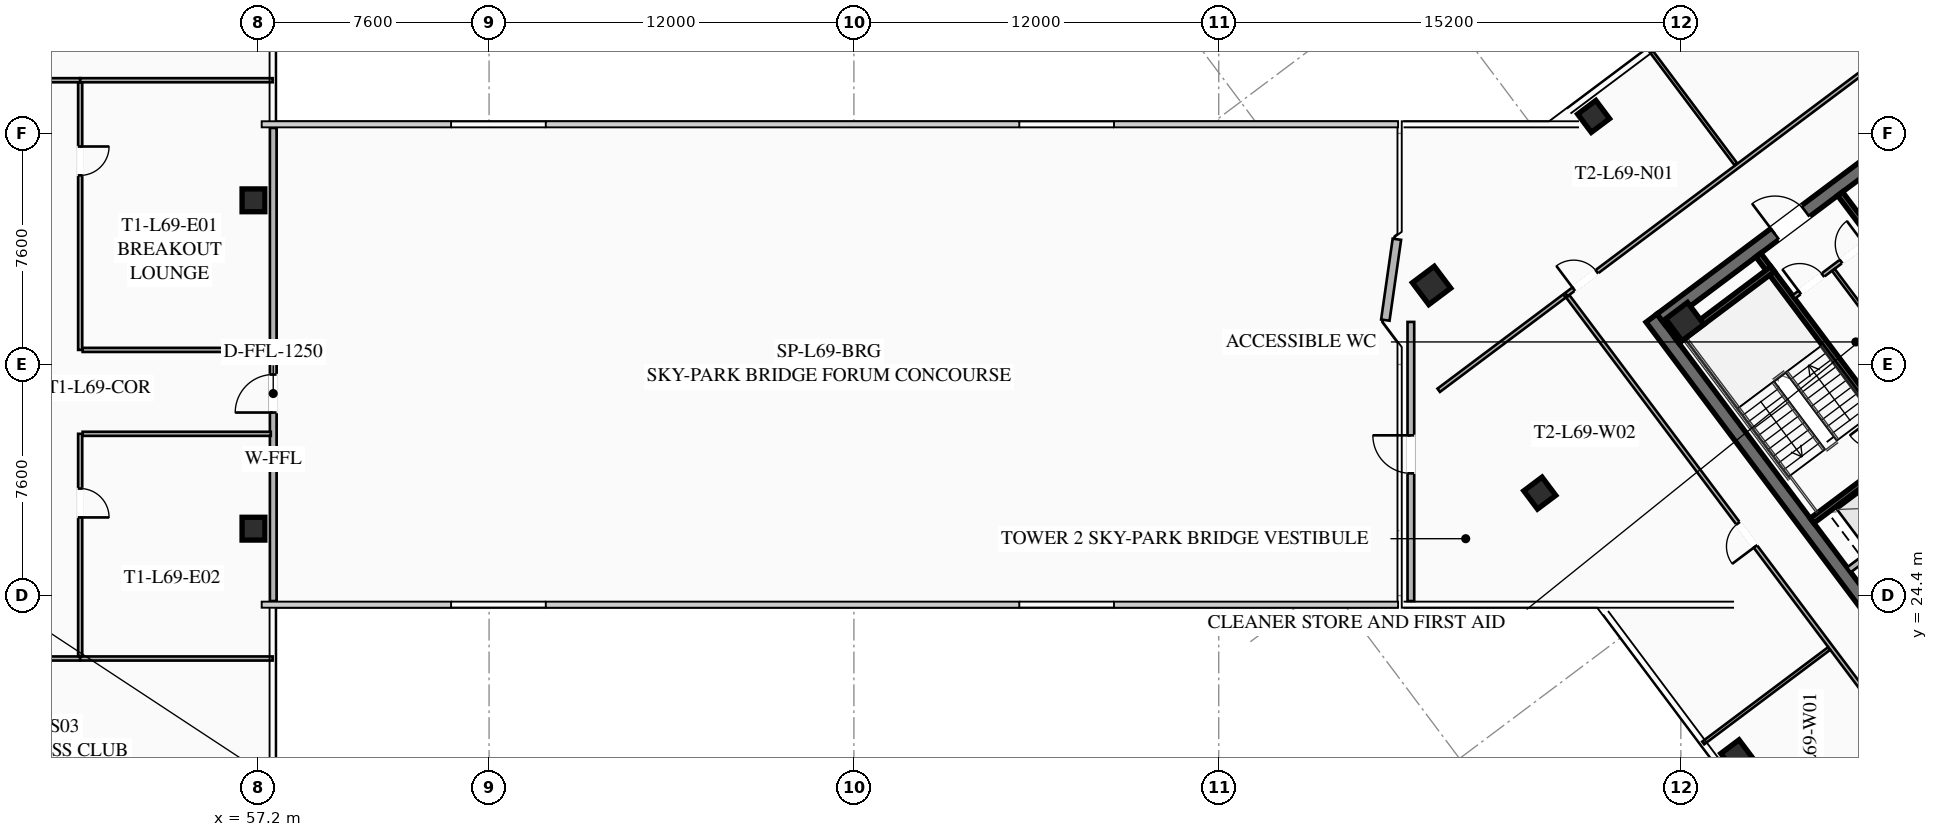
"""IFC4 building model, lengths in metres.
Left out: names, types, materials, properties, quantities, classifications, styles, units other than length and angle.
Written with IfcOpenShell. Run it as: python <this file> out.ifc"""

import sys

from ifc_helpers import new_model, si_unit, direction, frame, frame_2d, origin, origin_2d, place, context, subcontext, project, spatial, rectangle, hollow_rectangle, extrude, element, fill, save


model = new_model("IFC4")
c1 = context("Model", 3, precision=1e-05, world=origin(), true_north=direction((0.0, 1.0)))
c2 = subcontext(c1, "Body", "Model", "MODEL_VIEW")
j1 = project(units=[si_unit("LENGTHUNIT", "METRE"), si_unit("PLANEANGLEUNIT", "RADIAN")], contexts=[c1])
p1 = place(None, origin())
s1 = spatial("IfcSite", under=j1, at=p1, CompositionType="ELEMENT")
p2 = place(p1, origin())
s2 = spatial("IfcBuilding", under=s1, at=p2, CompositionType="ELEMENT")
p3 = place(p2, frame((0.0, 0.0, 255.4)))
s3 = spatial("IfcBuildingStorey", under=s2, at=p3, CompositionType="ELEMENT", Elevation=255.4)
for number, where, z_axis, x_axis in (
    (1, (57.05, 26.6, 0.0), (0.0, 0.0, 1.0), (1.0, 0.0, 0.0)),
    (2, (57.05, 37.4, 0.0), (0.0, 0.0, 1.0), (1.0, 0.0, 0.0)),
):
    element("IfcColumn", number, at=place(p3, frame(where, z_axis=z_axis, x_axis=x_axis)), inside=s3, PredefinedType="COLUMN", context=c2, shape_type="SweptSolid", body=[
        extrude(hollow_rectangle(XDim=0.75, YDim=0.75, WallThickness=0.032, at=origin_2d()), origin(), (0.0, 0.0, 1.0), 3.78),
    ])
p4 = place(p3, frame((112.396, 21.047, 0.0), z_axis=(0.0, 0.0, 1.0), x_axis=(-0.600005007985, 0.799996243986, 0.0)))
e3 = element("IfcWall", 3, at=p4, inside=s3, PredefinedType="SHEAR", context=c2, shape_type="SweptSolid", body=[
    extrude(rectangle(XDim=15.6, YDim=0.45, at=frame_2d((7.8, 0.0))), origin(), (0.0, 0.0, 1.0), 4.0),
])
p5 = place(p3, frame((103.351, 33.482, 0.0), z_axis=(0.0, 0.0, 1.0), x_axis=(0.8, 0.6, 0.0)))
e4 = element("IfcWall", 4, at=p5, inside=s3, PredefinedType="SHEAR", context=c2, shape_type="SweptSolid", body=[
    extrude(rectangle(XDim=15.26, YDim=0.45, at=frame_2d((7.63, 0.0))), origin(), (0.0, 0.0, 1.0), 4.0),
])
p6 = place(p5, frame((4.68, 0.0, 0.0)))
e5 = element("IfcOpeningElement", 5, at=p6, cuts=e4, PredefinedType="OPENING", context=c2, shape_type="SweptSolid", body=[
    extrude(rectangle(XDim=1.25, YDim=2.25, at=frame_2d((0.625, 1.125))), frame((0.0, 0.235, 0.0), z_axis=(0.0, -1.0, 0.0), x_axis=(1.0, 0.0, 0.0)), (0.0, 0.0, 1.0), 0.47),
])
p7 = place(p5, frame((9.73, 0.0, 0.0)))
e6 = element("IfcOpeningElement", 6, at=p7, cuts=e4, PredefinedType="OPENING", context=c2, shape_type="SweptSolid", body=[
    extrude(rectangle(XDim=1.25, YDim=2.25, at=frame_2d((0.625, 1.125))), frame((0.0, 0.235, 0.0), z_axis=(0.0, -1.0, 0.0), x_axis=(1.0, 0.0, 0.0)), (0.0, 0.0, 1.0), 0.47),
])
for number, where, z_axis, x_axis in (
    (7, (104.13, 33.41, 0.0), (0.0, 0.0, 1.0), (0.8, 0.6, 0.0)),
    (8, (95.8, 34.6, 0.0), (0.0, 0.0, 1.0), (0.8, 0.6, 0.0)),
):
    element("IfcColumn", number, at=place(p3, frame(where, z_axis=z_axis, x_axis=x_axis)), inside=s3, PredefinedType="COLUMN", context=c2, shape_type="SweptSolid", body=[
        extrude(hollow_rectangle(XDim=0.9, YDim=0.9, WallThickness=0.04, at=origin_2d()), origin(), (0.0, 0.0, 1.0), 3.78),
    ])
for number, where, z_axis, x_axis in (
    (9, (101.13, 40.16, 0.0), (0.0, 0.0, 1.0), (0.8, 0.6, 0.0)),
    (10, (99.36, 27.77, 0.0), (0.0, 0.0, 1.0), (0.8, 0.6, 0.0)),
    (11, (105.84, 19.13, 0.0), (0.0, 0.0, 1.0), (0.8, 0.6, 0.0)),
):
    element("IfcColumn", number, at=place(p3, frame(where, z_axis=z_axis, x_axis=x_axis)), inside=s3, PredefinedType="COLUMN", context=c2, shape_type="SweptSolid", body=[
        extrude(hollow_rectangle(XDim=0.75, YDim=0.75, WallThickness=0.032, at=origin_2d()), origin(), (0.0, 0.0, 1.0), 3.78),
    ])
p8 = place(p3, frame((94.28, 33.46, 0.0), z_axis=(0.0, 0.0, 1.0), x_axis=(0.141370477216, 0.989956760759, 0.0)))
e12 = element("IfcWall", 12, at=p8, inside=s3, PredefinedType="SOLIDWALL", context=c2, shape_type="SweptSolid", body=[
    extrude(rectangle(XDim=2.687, YDim=0.28, at=frame_2d((1.344, 0.0))), origin(), (0.0, 0.0, 1.0), 2.96),
])
p9 = place(p3, frame((57.7, 24.22, 0.0), z_axis=(0.0, 0.0, 1.0), x_axis=(0.0, 1.0, 0.0)))
e13 = element("IfcWall", 13, at=p9, inside=s3, PredefinedType="SOLIDWALL", context=c2, shape_type="SweptSolid", body=[
    extrude(rectangle(XDim=15.56, YDim=0.22, at=frame_2d((7.78, 0.0))), origin(), (0.0, 0.0, 1.0), 2.971),
])
p10 = place(p9, frame((6.2, 0.0, 0.0)))
e14 = element("IfcOpeningElement", 14, at=p10, cuts=e13, PredefinedType="OPENING", context=c2, shape_type="SweptSolid", body=[
    extrude(rectangle(XDim=1.25, YDim=2.25, at=frame_2d((0.625, 1.125))), frame((0.0, 0.12, 0.0), z_axis=(0.0, -1.0, 0.0), x_axis=(1.0, 0.0, 0.0)), (0.0, 0.0, 1.0), 0.24),
])
p11 = place(p3, frame((95.12, 24.22, 0.0), z_axis=(0.0, 0.0, 1.0), x_axis=(0.0, 1.0, 0.0)))
e15 = element("IfcWall", 15, at=p11, inside=s3, PredefinedType="SOLIDWALL", context=c2, shape_type="SweptSolid", body=[
    extrude(rectangle(XDim=9.18, YDim=0.22, at=frame_2d((4.59, 0.0))), origin(), (0.0, 0.0, 1.0), 2.971),
])
p12 = place(p11, frame((4.2, 0.0, 0.0)))
e16 = element("IfcOpeningElement", 16, at=p12, cuts=e15, PredefinedType="OPENING", context=c2, shape_type="SweptSolid", body=[
    extrude(rectangle(XDim=1.25, YDim=2.25, at=frame_2d((0.625, 1.125))), frame((0.0, 0.12, 0.0), z_axis=(0.0, -1.0, 0.0), x_axis=(1.0, 0.0, 0.0)), (0.0, 0.0, 1.0), 0.24),
])
p13 = place(p3, frame((28.45, 41.35, 0.0), z_axis=(0.0, 0.0, 1.0), x_axis=(1.0, 0.0, 0.0)))
e17 = element("IfcWall", 17, at=p13, inside=s3, PredefinedType="PARTITIONING", context=c2, shape_type="SweptSolid", body=[
    extrude(rectangle(XDim=22.9, YDim=0.135, at=frame_2d((11.45, 0.0))), origin(), (0.0, 0.0, 1.0), 2.971),
])
p14 = place(p13, frame((0.3, 0.0, 0.0)))
e18 = element("IfcOpeningElement", 18, at=p14, cuts=e17, PredefinedType="OPENING", context=c2, shape_type="SweptSolid", body=[
    extrude(rectangle(XDim=0.95, YDim=2.05, at=frame_2d((0.475, 1.025))), frame((0.0, 0.077, 0.0), z_axis=(0.0, -1.0, 0.0), x_axis=(1.0, 0.0, 0.0)), (0.0, 0.0, 1.0), 0.155),
])
p15 = place(p13, frame((13.344, 0.0, 0.0)))
e19 = element("IfcOpeningElement", 19, at=p15, cuts=e17, PredefinedType="OPENING", context=c2, shape_type="SweptSolid", body=[
    extrude(rectangle(XDim=0.95, YDim=2.05, at=frame_2d((0.475, 1.025))), frame((0.0, 0.077, 0.0), z_axis=(0.0, -1.0, 0.0), x_axis=(1.0, 0.0, 0.0)), (0.0, 0.0, 1.0), 0.155),
])
p16 = place(p3, frame((51.35, 41.35, 0.0), z_axis=(0.0, 0.0, 1.0), x_axis=(1.0, 0.0, 0.0)))
e20 = element("IfcWall", 20, at=p16, inside=s3, PredefinedType="PARTITIONING", context=c2, shape_type="SweptSolid", body=[
    extrude(rectangle(XDim=6.33, YDim=0.135, at=frame_2d((3.165, 0.0))), origin(), (0.0, 0.0, 1.0), 2.971),
])
p17 = place(p3, frame((51.35, 22.33, 0.0), z_axis=(0.0, 0.0, 1.0), x_axis=(-1.0, 0.0, 0.0)))
e21 = element("IfcWall", 21, at=p17, inside=s3, PredefinedType="PARTITIONING", context=c2, shape_type="SweptSolid", body=[
    extrude(rectangle(XDim=22.9, YDim=0.135, at=frame_2d((11.45, 0.0))), origin(), (0.0, 0.0, 1.0), 2.971),
])
p18 = place(p17, frame((21.57, 0.0, 0.0)))
e22 = element("IfcOpeningElement", 22, at=p18, cuts=e21, PredefinedType="OPENING", context=c2, shape_type="SweptSolid", body=[
    extrude(rectangle(XDim=0.95, YDim=2.05, at=frame_2d((0.475, 1.025))), frame((0.0, 0.077, 0.0), z_axis=(0.0, -1.0, 0.0), x_axis=(1.0, 0.0, 0.0)), (0.0, 0.0, 1.0), 0.155),
])
p19 = place(p17, frame((9.13, 0.0, 0.0)))
e23 = element("IfcOpeningElement", 23, at=p19, cuts=e21, PredefinedType="OPENING", context=c2, shape_type="SweptSolid", body=[
    extrude(rectangle(XDim=0.95, YDim=2.05, at=frame_2d((0.475, 1.025))), frame((0.0, 0.077, 0.0), z_axis=(0.0, -1.0, 0.0), x_axis=(1.0, 0.0, 0.0)), (0.0, 0.0, 1.0), 0.155),
])
p20 = place(p17, frame((4.906, 0.0, 0.0)))
e24 = element("IfcOpeningElement", 24, at=p20, cuts=e21, PredefinedType="OPENING", context=c2, shape_type="SweptSolid", body=[
    extrude(rectangle(XDim=0.95, YDim=2.05, at=frame_2d((0.475, 1.025))), frame((0.0, 0.077, 0.0), z_axis=(0.0, -1.0, 0.0), x_axis=(1.0, 0.0, 0.0)), (0.0, 0.0, 1.0), 0.155),
])
p21 = place(p3, frame((51.35, 22.33, 0.0), z_axis=(0.0, 0.0, 1.0), x_axis=(1.0, 0.0, 0.0)))
e25 = element("IfcWall", 25, at=p21, inside=s3, PredefinedType="PARTITIONING", context=c2, shape_type="SweptSolid", body=[
    extrude(rectangle(XDim=6.33, YDim=0.135, at=frame_2d((3.165, 0.0))), origin(), (0.0, 0.0, 1.0), 2.971),
])
p22 = place(p3, frame((51.35, 41.27, 0.0), z_axis=(0.0, 0.0, 1.0), x_axis=(0.0, -1.0, 0.0)))
e26 = element("IfcWall", 26, at=p22, inside=s3, PredefinedType="PARTITIONING", context=c2, shape_type="SweptSolid", body=[
    extrude(rectangle(XDim=8.79, YDim=0.135, at=frame_2d((4.395, 0.0))), origin(), (0.0, 0.0, 1.0), 2.971),
])
p23 = place(p22, frame((2.1, 0.0, 0.0)))
e27 = element("IfcOpeningElement", 27, at=p23, cuts=e26, PredefinedType="OPENING", context=c2, shape_type="SweptSolid", body=[
    extrude(rectangle(XDim=0.95, YDim=2.05, at=frame_2d((0.475, 1.025))), frame((0.0, 0.077, 0.0), z_axis=(0.0, -1.0, 0.0), x_axis=(1.0, 0.0, 0.0)), (0.0, 0.0, 1.0), 0.155),
])
p24 = place(p3, frame((51.35, 29.72, 0.0), z_axis=(0.0, 0.0, 1.0), x_axis=(0.0, -1.0, 0.0)))
e28 = element("IfcWall", 28, at=p24, inside=s3, PredefinedType="PARTITIONING", context=c2, shape_type="SweptSolid", body=[
    extrude(rectangle(XDim=7.31, YDim=0.135, at=frame_2d((3.655, 0.0))), origin(), (0.0, 0.0, 1.0), 2.971),
])
p25 = place(p24, frame((1.8, 0.0, 0.0)))
e29 = element("IfcOpeningElement", 29, at=p25, cuts=e28, PredefinedType="OPENING", context=c2, shape_type="SweptSolid", body=[
    extrude(rectangle(XDim=0.95, YDim=2.05, at=frame_2d((0.475, 1.025))), frame((0.0, 0.077, 0.0), z_axis=(0.0, -1.0, 0.0), x_axis=(1.0, 0.0, 0.0)), (0.0, 0.0, 1.0), 0.155),
])
for number, where, z_axis, x_axis in (
    (30, (51.43, 32.48, 0.0), (0.0, 0.0, 1.0), (1.0, 0.0, 0.0)),
    (31, (57.62, 29.72, 0.0), (0.0, 0.0, 1.0), (-1.0, 0.0, 0.0)),
):
    element("IfcWall", number, at=place(p3, frame(where, z_axis=z_axis, x_axis=x_axis)), inside=s3, PredefinedType="PARTITIONING", context=c2, shape_type="SweptSolid", body=[
        extrude(rectangle(XDim=6.19, YDim=0.135, at=frame_2d((3.095, 0.0))), origin(), (0.0, 0.0, 1.0), 2.971),
    ])
p26 = place(p3, frame((111.44, 29.08, 0.0), z_axis=(0.0, 0.0, 1.0), x_axis=(-0.59999041401, 0.800007189403, 0.0)))
e32 = element("IfcWall", 32, at=p26, inside=s3, PredefinedType="SHEAR", context=c2, shape_type="SweptSolid", body=[
    extrude(rectangle(XDim=8.15, YDim=0.2, at=frame_2d((4.075, 0.0))), origin(), (0.0, 0.0, 1.0), 3.78),
])
p27 = place(p26, frame((0.45, 0.0, 0.0)))
e33 = element("IfcOpeningElement", 33, at=p27, cuts=e32, PredefinedType="OPENING", context=c2, shape_type="SweptSolid", body=[
    extrude(rectangle(XDim=1.15, YDim=2.2, at=frame_2d((0.575, 1.1))), frame((0.0, 0.11, 0.0), z_axis=(0.0, -1.0, 0.0), x_axis=(1.0, 0.0, 0.0)), (0.0, 0.0, 1.0), 0.22),
])
for number, where, z_axis, x_axis in (
    (34, (108.316, 26.862, 0.0), (0.0, 0.0, 1.0), (0.8, 0.6, 0.0)),
    (35, (103.876, 32.782, 0.0), (0.0, 0.0, 1.0), (0.8, 0.6, 0.0)),
):
    element("IfcWall", number, at=place(p3, frame(where, z_axis=z_axis, x_axis=x_axis)), inside=s3, PredefinedType="SHEAR", context=c2, shape_type="SweptSolid", body=[
        extrude(rectangle(XDim=3.93, YDim=0.2, at=frame_2d((1.965, 0.0))), origin(), (0.0, 0.0, 1.0), 3.78),
    ])
p28 = place(p3, frame((118.058, 25.856, 0.0), z_axis=(0.0, 0.0, 1.0), x_axis=(-0.600002657301, 0.799998007018, 0.0)))
e36 = element("IfcWall", 36, at=p28, inside=s3, PredefinedType="SHEAR", context=c2, shape_type="SweptSolid", body=[
    extrude(rectangle(XDim=14.7, YDim=0.2, at=frame_2d((7.35, 0.0))), origin(), (0.0, 0.0, 1.0), 3.78),
])
p29 = place(p3, frame((109.528, 25.246, 0.0), z_axis=(0.0, 0.0, 1.0), x_axis=(0.800008183455, 0.599989088572, 0.0)))
e37 = element("IfcWall", 37, at=p29, inside=s3, PredefinedType="SOLIDWALL", context=c2, shape_type="SweptSolid", body=[
    extrude(rectangle(XDim=3.58, YDim=0.2, at=frame_2d((1.79, 0.0))), origin(), (0.0, 0.0, 1.0), 3.78),
])
p30 = place(p3, frame((107.71, 34.22, 0.0), z_axis=(0.0, 0.0, 1.0), x_axis=(0.799981399002, 0.60002480053, 0.0)))
e38 = element("IfcWall", 38, at=p30, inside=s3, PredefinedType="PARTITIONING", context=c2, shape_type="SweptSolid", body=[
    extrude(rectangle(XDim=3.15, YDim=0.135, at=frame_2d((1.575, 0.0))), origin(), (0.0, 0.0, 1.0), 2.971),
])
p31 = place(p30, frame((0.25, 0.0, 0.0)))
e39 = element("IfcOpeningElement", 39, at=p31, cuts=e38, PredefinedType="OPENING", context=c2, shape_type="SweptSolid", body=[
    extrude(rectangle(XDim=0.95, YDim=2.05, at=frame_2d((0.475, 1.025))), frame((0.0, 0.077, 0.0), z_axis=(0.0, -1.0, 0.0), x_axis=(1.0, 0.0, 0.0)), (0.0, 0.0, 1.0), 0.155),
])
p32 = place(p30, frame((1.95, 0.0, 0.0)))
e40 = element("IfcOpeningElement", 40, at=p32, cuts=e38, PredefinedType="OPENING", context=c2, shape_type="SweptSolid", body=[
    extrude(rectangle(XDim=0.95, YDim=2.05, at=frame_2d((0.475, 1.025))), frame((0.0, 0.077, 0.0), z_axis=(0.0, -1.0, 0.0), x_axis=(1.0, 0.0, 0.0)), (0.0, 0.0, 1.0), 0.155),
])
p33 = place(p3, frame((111.296, 32.072, 0.0), z_axis=(0.0, 0.0, 1.0), x_axis=(-0.59995887973, 0.800030838552, 0.0)))
e41 = element("IfcWall", 41, at=p33, inside=s3, PredefinedType="PARTITIONING", context=c2, shape_type="SweptSolid", body=[
    extrude(rectangle(XDim=3.8, YDim=0.11, at=frame_2d((1.9, 0.0))), origin(), (0.0, 0.0, 1.0), 2.971),
])
p34 = place(p3, frame((100.236, 34.302, 0.0), z_axis=(0.0, 0.0, 1.0), x_axis=(0.799997393501, 0.600003475316, 0.0)))
e42 = element("IfcWall", 42, at=p34, inside=s3, PredefinedType="PARTITIONING", context=c2, shape_type="SweptSolid", body=[
    extrude(rectangle(XDim=22.48, YDim=0.135, at=frame_2d((11.24, 0.0))), origin(), (0.0, 0.0, 1.0), 2.971),
])
p35 = place(p34, frame((0.3, 0.0, 0.0)))
e43 = element("IfcOpeningElement", 43, at=p35, cuts=e42, PredefinedType="OPENING", context=c2, shape_type="SweptSolid", body=[
    extrude(rectangle(XDim=0.95, YDim=2.05, at=frame_2d((0.475, 1.025))), frame((0.0, 0.077, 0.0), z_axis=(0.0, -1.0, 0.0), x_axis=(1.0, 0.0, 0.0)), (0.0, 0.0, 1.0), 0.155),
])
p36 = place(p34, frame((21.23, 0.0, 0.0)))
e44 = element("IfcOpeningElement", 44, at=p36, cuts=e42, PredefinedType="OPENING", context=c2, shape_type="SweptSolid", body=[
    extrude(rectangle(XDim=0.95, YDim=2.05, at=frame_2d((0.475, 1.025))), frame((0.0, 0.077, 0.0), z_axis=(0.0, -1.0, 0.0), x_axis=(1.0, 0.0, 0.0)), (0.0, 0.0, 1.0), 0.155),
])
p37 = place(p3, frame((105.812, 38.584, 0.0), z_axis=(0.0, 0.0, 1.0), x_axis=(-0.600008311051, 0.799993766644, 0.0)))
e45 = element("IfcWall", 45, at=p37, inside=s3, PredefinedType="PARTITIONING", context=c2, shape_type="SweptSolid", body=[
    extrude(rectangle(XDim=4.7, YDim=0.11, at=frame_2d((2.35, 0.0))), origin(), (0.0, 0.0, 1.0), 2.971),
])
p38 = place(p3, frame((111.99, 18.63, 0.0), z_axis=(0.0, 0.0, 1.0), x_axis=(-0.599997997836, 0.800001501619, 0.0)))
e46 = element("IfcWall", 46, at=p38, inside=s3, PredefinedType="PARTITIONING", context=c2, shape_type="SweptSolid", body=[
    extrude(rectangle(XDim=19.51, YDim=0.135, at=frame_2d((9.755, 0.0))), origin(), (0.0, 0.0, 1.0), 2.971),
])
p39 = place(p38, frame((0.3, 0.0, 0.0)))
e47 = element("IfcOpeningElement", 47, at=p39, cuts=e46, PredefinedType="OPENING", context=c2, shape_type="SweptSolid", body=[
    extrude(rectangle(XDim=0.95, YDim=2.05, at=frame_2d((0.475, 1.025))), frame((0.0, 0.077, 0.0), z_axis=(0.0, -1.0, 0.0), x_axis=(1.0, 0.0, 0.0)), (0.0, 0.0, 1.0), 0.155),
])
p40 = place(p38, frame((9.232, 0.0, 0.0)))
e48 = element("IfcOpeningElement", 48, at=p40, cuts=e46, PredefinedType="OPENING", context=c2, shape_type="SweptSolid", body=[
    extrude(rectangle(XDim=0.95, YDim=2.05, at=frame_2d((0.475, 1.025))), frame((0.0, 0.077, 0.0), z_axis=(0.0, -1.0, 0.0), x_axis=(1.0, 0.0, 0.0)), (0.0, 0.0, 1.0), 0.155),
])
p41 = place(p3, frame((100.172, 34.254, 0.0), z_axis=(0.0, 0.0, 1.0), x_axis=(-0.800033998508, -0.59995466598, 0.0)))
e49 = element("IfcWall", 49, at=p41, inside=s3, PredefinedType="PARTITIONING", context=c2, shape_type="SweptSolid", body=[
    extrude(rectangle(XDim=5.17, YDim=0.135, at=frame_2d((2.585, 0.0))), origin(), (0.0, 0.0, 1.0), 2.971),
])
p42 = place(p3, frame((104.736, 19.552, 0.0), z_axis=(0.0, 0.0, 1.0), x_axis=(0.799994333279, 0.600007555554, 0.0)))
e50 = element("IfcWall", 50, at=p42, inside=s3, PredefinedType="PARTITIONING", context=c2, shape_type="SweptSolid", body=[
    extrude(rectangle(XDim=5.17, YDim=0.11, at=frame_2d((2.585, 0.0))), origin(), (0.0, 0.0, 1.0), 2.971),
])
p43 = place(p10, origin())
e51 = element("IfcDoor", 51, at=p43, inside=s3, OperationType="SINGLE_SWING_LEFT", PredefinedType="DOOR", context=c2, shape_type="SweptSolid", body=[
    extrude(rectangle(XDim=1.25, YDim=2.25, at=frame_2d((0.625, 1.125))), frame((0.0, 0.025, 0.0), z_axis=(0.0, -1.0, 0.0), x_axis=(1.0, 0.0, 0.0)), (0.0, 0.0, 1.0), 0.05),
])
fill(e14, e51)
p44 = place(p12, origin())
e52 = element("IfcDoor", 52, at=p44, inside=s3, OperationType="SINGLE_SWING_RIGHT", PredefinedType="DOOR", context=c2, shape_type="SweptSolid", body=[
    extrude(rectangle(XDim=1.25, YDim=2.25, at=frame_2d((0.625, 1.125))), frame((0.0, 0.025, 0.0), z_axis=(0.0, -1.0, 0.0), x_axis=(1.0, 0.0, 0.0)), (0.0, 0.0, 1.0), 0.05),
])
fill(e16, e52)
p45 = place(p23, origin())
e53 = element("IfcDoor", 53, at=p45, inside=s3, OperationType="SINGLE_SWING_LEFT", PredefinedType="DOOR", context=c2, shape_type="SweptSolid", body=[
    extrude(rectangle(XDim=0.95, YDim=2.05, at=frame_2d((0.475, 1.025))), frame((0.0, 0.025, 0.0), z_axis=(0.0, -1.0, 0.0), x_axis=(1.0, 0.0, 0.0)), (0.0, 0.0, 1.0), 0.05),
])
fill(e27, e53)
p46 = place(p25, origin())
e54 = element("IfcDoor", 54, at=p46, inside=s3, OperationType="SINGLE_SWING_RIGHT", PredefinedType="DOOR", context=c2, shape_type="SweptSolid", body=[
    extrude(rectangle(XDim=0.95, YDim=2.05, at=frame_2d((0.475, 1.025))), frame((0.0, 0.025, 0.0), z_axis=(0.0, -1.0, 0.0), x_axis=(1.0, 0.0, 0.0)), (0.0, 0.0, 1.0), 0.05),
])
fill(e29, e54)
p47 = place(p6, origin())
e55 = element("IfcDoor", 55, at=p47, inside=s3, OperationType="SINGLE_SWING_LEFT", PredefinedType="DOOR", context=c2, shape_type="SweptSolid", body=[
    extrude(rectangle(XDim=1.25, YDim=2.25, at=frame_2d((0.625, 1.125))), frame((0.0, 0.025, 0.0), z_axis=(0.0, -1.0, 0.0), x_axis=(1.0, 0.0, 0.0)), (0.0, 0.0, 1.0), 0.05),
])
fill(e5, e55)
p48 = place(p31, origin())
e56 = element("IfcDoor", 56, at=p48, inside=s3, OperationType="SINGLE_SWING_LEFT", PredefinedType="DOOR", context=c2, shape_type="SweptSolid", body=[
    extrude(rectangle(XDim=0.95, YDim=2.05, at=frame_2d((0.475, 1.025))), frame((0.0, 0.025, 0.0), z_axis=(0.0, -1.0, 0.0), x_axis=(1.0, 0.0, 0.0)), (0.0, 0.0, 1.0), 0.05),
])
fill(e39, e56)
p49 = place(p32, origin())
e57 = element("IfcDoor", 57, at=p49, inside=s3, OperationType="SINGLE_SWING_RIGHT", PredefinedType="DOOR", context=c2, shape_type="SweptSolid", body=[
    extrude(rectangle(XDim=0.95, YDim=2.05, at=frame_2d((0.475, 1.025))), frame((0.0, 0.025, 0.0), z_axis=(0.0, -1.0, 0.0), x_axis=(1.0, 0.0, 0.0)), (0.0, 0.0, 1.0), 0.05),
])
fill(e40, e57)
p50 = place(p35, origin())
e58 = element("IfcDoor", 58, at=p50, inside=s3, OperationType="SINGLE_SWING_LEFT", PredefinedType="DOOR", context=c2, shape_type="SweptSolid", body=[
    extrude(rectangle(XDim=0.95, YDim=2.05, at=frame_2d((0.475, 1.025))), frame((0.0, 0.025, 0.0), z_axis=(0.0, -1.0, 0.0), x_axis=(1.0, 0.0, 0.0)), (0.0, 0.0, 1.0), 0.05),
])
fill(e43, e58)
p51 = place(p40, origin())
e59 = element("IfcDoor", 59, at=p51, inside=s3, OperationType="SINGLE_SWING_LEFT", PredefinedType="DOOR", context=c2, shape_type="SweptSolid", body=[
    extrude(rectangle(XDim=0.95, YDim=2.05, at=frame_2d((0.475, 1.025))), frame((0.0, 0.025, 0.0), z_axis=(0.0, -1.0, 0.0), x_axis=(1.0, 0.0, 0.0)), (0.0, 0.0, 1.0), 0.05),
])
fill(e48, e59)
save(model, sys.argv[1])
